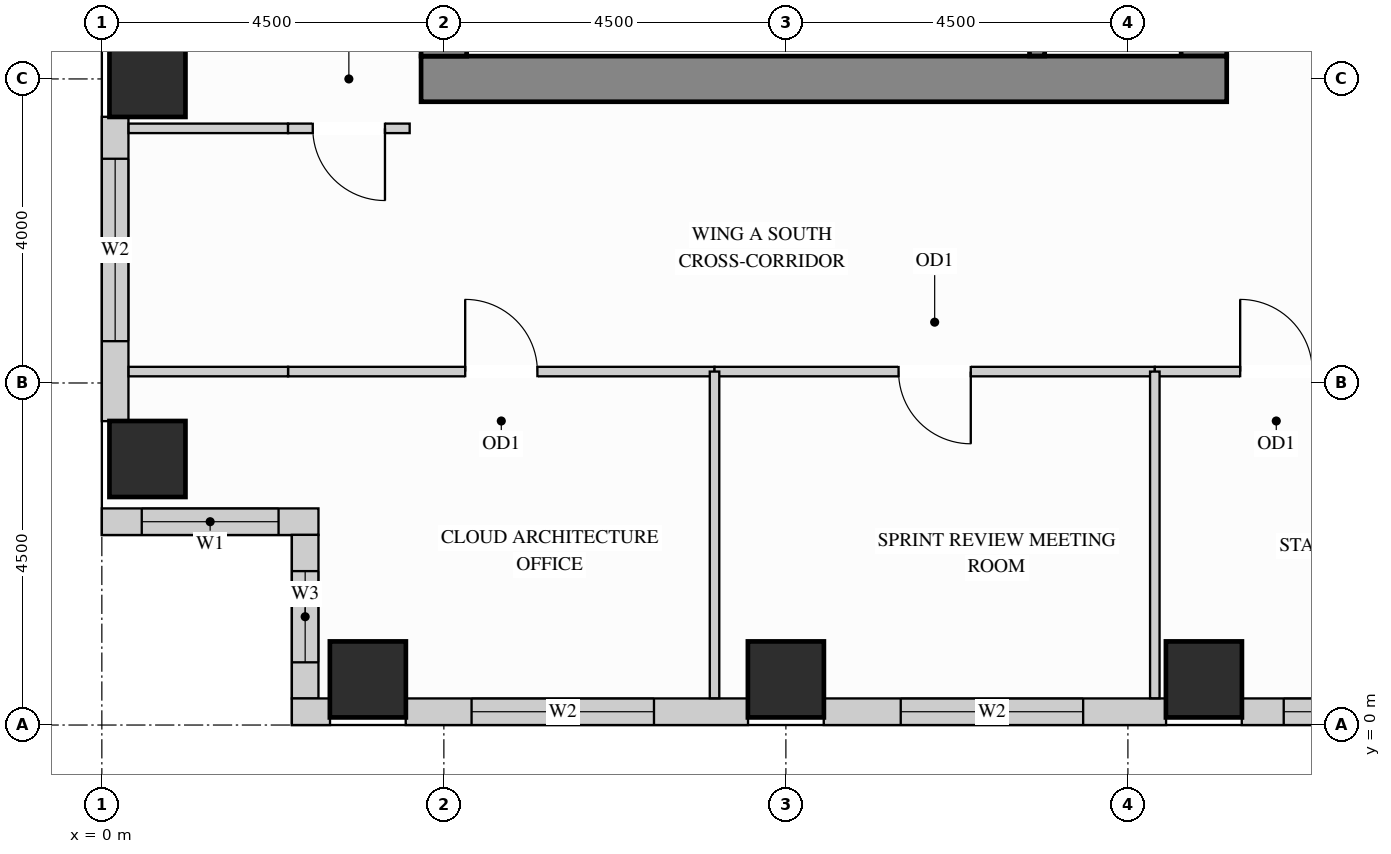
"""IFC4 building model, lengths in metres.
Left out: names, types, materials, properties, quantities, classifications, styles, units other than length and angle.
Written with IfcOpenShell. Run it as: python <this file> out.ifc"""

import sys

from ifc_helpers import new_model, si_unit, direction, frame, frame_2d, origin, origin_2d, place, context, subcontext, project, spatial, rectangle, extrude, source, transform, mapped, element, fill, save


model = new_model("IFC4")
c1 = context("Model", 3, precision=1e-05, world=origin(), true_north=direction((0.0, 1.0)))
c2 = subcontext(c1, "Body", "Model", "MODEL_VIEW")
j1 = project(units=[si_unit("LENGTHUNIT", "METRE"), si_unit("PLANEANGLEUNIT", "RADIAN")], contexts=[c1])
p1 = place(None, origin())
s1 = spatial("IfcSite", under=j1, at=p1, CompositionType="ELEMENT")
p2 = place(p1, origin())
s2 = spatial("IfcBuilding", under=s1, at=p2, CompositionType="ELEMENT")
p3 = place(p2, frame((0.0, 0.0, 143.1)))
s3 = spatial("IfcBuildingStorey", under=s2, at=p3, CompositionType="ELEMENT", Elevation=143.1)
m1 = source(origin(), c2, "Body", "SweptSolid", [
    extrude(rectangle(XDim=1.0, YDim=1.0, at=origin_2d()), origin(), (0.0, 0.0, 1.0), 3.4),
])
for number, where, z_axis, x_axis in (
    (1, (14.5, 0.6, 0.0), (0.0, 0.0, 1.0), (1.0, 0.0, 0.0)),
    (2, (3.5, 0.6, 0.0), (0.0, 0.0, 1.0), (1.0, 0.0, 0.0)),
    (3, (9.0, 0.6, 0.0), (0.0, 0.0, 1.0), (1.0, 0.0, 0.0)),
    (4, (0.6, 3.5, 0.0), (0.0, 0.0, 1.0), (1.0, 0.0, 0.0)),
    (5, (0.6, 8.5, 0.0), (0.0, 0.0, 1.0), (1.0, 0.0, 0.0)),
):
    element("IfcColumn", number, at=place(p3, frame(where, z_axis=z_axis, x_axis=x_axis)), inside=s3, PredefinedType="COLUMN", context=c2, shape_type="MappedRepresentation", body=[
        mapped(m1, transform((0.0, 0.0, 0.0), x_axis=(1.0, 0.0, 0.0), y_axis=(0.0, 1.0, 0.0), z_axis=(0.0, 0.0, 1.0))),
    ])
m2 = source(origin(), c2, "Body", "SweptSolid", [
    extrude(rectangle(XDim=10.02, YDim=0.6, at=frame_2d((5.01, 0.0))), origin(), (0.0, 0.0, 1.0), 3.4),
])
p4 = place(p3, frame((14.5, 8.8, 0.0), z_axis=(0.0, 0.0, 1.0), x_axis=(0.0, 1.0, 0.0)))
e6 = element("IfcWall", 6, at=p4, inside=s3, PredefinedType="SHEAR", context=c2, shape_type="MappedRepresentation", body=[
    mapped(m2, transform((0.0, 0.0, 0.0), x_axis=(1.0, 0.0, 0.0), y_axis=(0.0, 1.0, 0.0), z_axis=(0.0, 0.0, 1.0))),
])
m3 = source(origin(), c2, "Body", "SweptSolid", [
    extrude(rectangle(XDim=10.6, YDim=0.6, at=frame_2d((5.3, 0.0))), origin(), (0.0, 0.0, 1.0), 3.4),
])
p5 = place(p3, frame((4.2, 8.5, 0.0), z_axis=(0.0, 0.0, 1.0), x_axis=(1.0, 0.0, 0.0)))
e7 = element("IfcWall", 7, at=p5, inside=s3, PredefinedType="SHEAR", context=c2, shape_type="MappedRepresentation", body=[
    mapped(m3, transform((0.0, 0.0, 0.0), x_axis=(1.0, 0.0, 0.0), y_axis=(0.0, 1.0, 0.0), z_axis=(0.0, 0.0, 1.0))),
])
m4 = source(origin(), c2, "Body", "SweptSolid", [
    extrude(rectangle(XDim=20.4, YDim=0.6, at=frame_2d((10.2, 0.0))), origin(), (0.0, 0.0, 1.0), 3.4),
])
p6 = place(p3, frame((4.5, 8.8, 0.0), z_axis=(0.0, 0.0, 1.0), x_axis=(0.0, 1.0, 0.0)))
e8 = element("IfcWall", 8, at=p6, inside=s3, PredefinedType="SHEAR", context=c2, shape_type="MappedRepresentation", body=[
    mapped(m4, transform((0.0, 0.0, 0.0), x_axis=(1.0, 0.0, 0.0), y_axis=(0.0, 1.0, 0.0), z_axis=(0.0, 0.0, 1.0))),
])
p7 = place(p3, frame((0.175, 8.002, 0.0), z_axis=(0.0, 0.0, 1.0), x_axis=(0.0, -1.0, 0.0)))
e9 = element("IfcWall", 9, at=p7, inside=s3, PredefinedType="SOLIDWALL", context=c2, shape_type="SweptSolid", body=[
    extrude(rectangle(XDim=4.004, YDim=0.35, at=frame_2d((2.002, 0.0))), origin(), (0.0, 0.0, 1.0), 2.612),
])
p8 = place(p7, frame((0.552, 0.0, 0.78)))
e10 = element("IfcOpeningElement", 10, at=p8, cuts=e9, PredefinedType="OPENING", context=c2, shape_type="SweptSolid", body=[
    extrude(rectangle(XDim=2.4, YDim=1.652, at=frame_2d((1.2, 0.826))), frame((0.0, 0.185, 0.0), z_axis=(0.0, -1.0, 0.0), x_axis=(1.0, 0.0, 0.0)), (0.0, 0.0, 1.0), 0.37),
])
p9 = place(p3, frame((0.0, 2.675, 0.0), z_axis=(0.0, 0.0, 1.0), x_axis=(1.0, 0.0, 0.0)))
e11 = element("IfcWall", 11, at=p9, inside=s3, PredefinedType="SOLIDWALL", context=c2, shape_type="SweptSolid", body=[
    extrude(rectangle(XDim=2.85, YDim=0.35, at=frame_2d((1.425, 0.0))), origin(), (0.0, 0.0, 1.0), 3.385),
])
p10 = place(p9, frame((0.525, 0.0, 0.78)))
e12 = element("IfcOpeningElement", 12, at=p10, cuts=e11, PredefinedType="OPENING", context=c2, shape_type="SweptSolid", body=[
    extrude(rectangle(XDim=1.8, YDim=2.1, at=frame_2d((0.9, 1.05))), frame((0.0, 0.185, 0.0), z_axis=(0.0, -1.0, 0.0), x_axis=(1.0, 0.0, 0.0)), (0.0, 0.0, 1.0), 0.37),
])
p11 = place(p3, frame((2.675, 2.502, 0.0), z_axis=(0.0, 0.0, 1.0), x_axis=(0.0, -1.0, 0.0)))
e13 = element("IfcWall", 13, at=p11, inside=s3, PredefinedType="SOLIDWALL", context=c2, shape_type="SweptSolid", body=[
    extrude(rectangle(XDim=2.154, YDim=0.35, at=frame_2d((1.077, 0.0))), origin(), (0.0, 0.0, 1.0), 3.385),
])
p12 = place(p11, frame((0.477, 0.0, 0.78)))
e14 = element("IfcOpeningElement", 14, at=p12, cuts=e13, PredefinedType="OPENING", context=c2, shape_type="SweptSolid", body=[
    extrude(rectangle(XDim=1.2, YDim=2.1, at=frame_2d((0.6, 1.05))), frame((0.0, 0.185, 0.0), z_axis=(0.0, -1.0, 0.0), x_axis=(1.0, 0.0, 0.0)), (0.0, 0.0, 1.0), 0.37),
])
m5 = source(origin(), c2, "Body", "SweptSolid", [
    extrude(rectangle(XDim=0.502, YDim=0.35, at=frame_2d((0.251, 0.0))), origin(), (0.0, 0.0, 1.0), 3.385),
])
p13 = place(p3, frame((2.5, 0.175, 0.0), z_axis=(0.0, 0.0, 1.0), x_axis=(1.0, 0.0, 0.0)))
e15 = element("IfcWall", 15, at=p13, inside=s3, PredefinedType="SOLIDWALL", context=c2, shape_type="MappedRepresentation", body=[
    mapped(m5, transform((0.0, 0.0, 0.0), x_axis=(1.0, 0.0, 0.0), y_axis=(0.0, 1.0, 0.0), z_axis=(0.0, 0.0, 1.0))),
])
p14 = place(p3, frame((3.998, 0.175, 0.0), z_axis=(0.0, 0.0, 1.0), x_axis=(1.0, 0.0, 0.0)))
e16 = element("IfcWall", 16, at=p14, inside=s3, PredefinedType="SOLIDWALL", context=c2, shape_type="SweptSolid", body=[
    extrude(rectangle(XDim=4.504, YDim=0.35, at=frame_2d((2.252, 0.0))), origin(), (0.0, 0.0, 1.0), 2.612),
])
p15 = place(p14, frame((0.866, 0.0, 0.78)))
e17 = element("IfcOpeningElement", 17, at=p15, cuts=e16, PredefinedType="OPENING", context=c2, shape_type="SweptSolid", body=[
    extrude(rectangle(XDim=2.4, YDim=1.652, at=frame_2d((1.2, 0.826))), frame((0.0, 0.185, 0.0), z_axis=(0.0, -1.0, 0.0), x_axis=(1.0, 0.0, 0.0)), (0.0, 0.0, 1.0), 0.37),
])
p16 = place(p3, frame((9.498, 0.175, 0.0), z_axis=(0.0, 0.0, 1.0), x_axis=(1.0, 0.0, 0.0)))
e18 = element("IfcWall", 18, at=p16, inside=s3, PredefinedType="SOLIDWALL", context=c2, shape_type="SweptSolid", body=[
    extrude(rectangle(XDim=4.504, YDim=0.35, at=frame_2d((2.252, 0.0))), origin(), (0.0, 0.0, 1.0), 2.612),
])
p17 = place(p16, frame((1.013, 0.0, 0.78)))
e19 = element("IfcOpeningElement", 19, at=p17, cuts=e18, PredefinedType="OPENING", context=c2, shape_type="SweptSolid", body=[
    extrude(rectangle(XDim=2.4, YDim=1.652, at=frame_2d((1.2, 0.826))), frame((0.0, 0.185, 0.0), z_axis=(0.0, -1.0, 0.0), x_axis=(1.0, 0.0, 0.0)), (0.0, 0.0, 1.0), 0.37),
])
p18 = place(p3, frame((14.998, 0.175, 0.0), z_axis=(0.0, 0.0, 1.0), x_axis=(1.0, 0.0, 0.0)))
e20 = element("IfcWall", 20, at=p18, inside=s3, PredefinedType="SOLIDWALL", context=c2, shape_type="SweptSolid", body=[
    extrude(rectangle(XDim=3.504, YDim=0.35, at=frame_2d((1.752, 0.0))), origin(), (0.0, 0.0, 1.0), 2.612),
])
p19 = place(p18, frame((0.552, 0.0, 0.78)))
e21 = element("IfcOpeningElement", 21, at=p19, cuts=e20, PredefinedType="OPENING", context=c2, shape_type="SweptSolid", body=[
    extrude(rectangle(XDim=2.4, YDim=1.652, at=frame_2d((1.2, 0.826))), frame((0.0, 0.185, 0.0), z_axis=(0.0, -1.0, 0.0), x_axis=(1.0, 0.0, 0.0)), (0.0, 0.0, 1.0), 0.37),
])
m6 = source(origin(), c2, "Body", "SweptSolid", [
    extrude(rectangle(XDim=2.098, YDim=0.125, at=frame_2d((1.049, 0.0))), origin(), (0.0, 0.0, 1.0), 3.385),
])
p20 = place(p3, frame((0.352, 7.85, 0.0), z_axis=(0.0, 0.0, 1.0), x_axis=(1.0, 0.0, 0.0)))
e22 = element("IfcWall", 22, at=p20, inside=s3, PredefinedType="PARTITIONING", context=c2, shape_type="MappedRepresentation", body=[
    mapped(m6, transform((0.0, 0.0, 0.0), x_axis=(1.0, 0.0, 0.0), y_axis=(0.0, 1.0, 0.0), z_axis=(0.0, 0.0, 1.0))),
])
p21 = place(p3, frame((2.45, 7.85, 0.0), z_axis=(0.0, 0.0, 1.0), x_axis=(1.0, 0.0, 0.0)))
e23 = element("IfcWall", 23, at=p21, inside=s3, PredefinedType="PARTITIONING", context=c2, shape_type="SweptSolid", body=[
    extrude(rectangle(XDim=1.6, YDim=0.125, at=frame_2d((0.8, 0.0))), origin(), (0.0, 0.0, 1.0), 3.385),
])
p22 = place(p21, frame((0.325, 0.0, 0.0)))
e24 = element("IfcOpeningElement", 24, at=p22, cuts=e23, PredefinedType="OPENING", context=c2, shape_type="SweptSolid", body=[
    extrude(rectangle(XDim=0.95, YDim=2.15, at=frame_2d((0.475, 1.075))), frame((0.0, 0.073, 0.0), z_axis=(0.0, -1.0, 0.0), x_axis=(1.0, 0.0, 0.0)), (0.0, 0.0, 1.0), 0.145),
])
p23 = place(p3, frame((2.45, 4.65, 0.0), z_axis=(0.0, 0.0, 1.0), x_axis=(1.0, 0.0, 0.0)))
e25 = element("IfcWall", 25, at=p23, inside=s3, PredefinedType="PARTITIONING", context=c2, shape_type="SweptSolid", body=[
    extrude(rectangle(XDim=5.611, YDim=0.125, at=frame_2d((2.806, 0.0))), origin(), (0.0, 0.0, 1.0), 2.848),
])
p24 = place(p23, frame((2.331, 0.0, 0.0)))
e26 = element("IfcOpeningElement", 26, at=p24, cuts=e25, PredefinedType="OPENING", context=c2, shape_type="SweptSolid", body=[
    extrude(rectangle(XDim=0.95, YDim=2.15, at=frame_2d((0.475, 1.075))), frame((0.0, 0.073, 0.0), z_axis=(0.0, -1.0, 0.0), x_axis=(1.0, 0.0, 0.0)), (0.0, 0.0, 1.0), 0.145),
])
p25 = place(p3, frame((8.061, 4.65, 0.0), z_axis=(0.0, 0.0, 1.0), x_axis=(1.0, 0.0, 0.0)))
e27 = element("IfcWall", 27, at=p25, inside=s3, PredefinedType="PARTITIONING", context=c2, shape_type="SweptSolid", body=[
    extrude(rectangle(XDim=5.793, YDim=0.125, at=frame_2d((2.896, 0.0))), origin(), (0.0, 0.0, 1.0), 2.848),
])
p26 = place(p25, frame((2.421, 0.0, 0.0)))
e28 = element("IfcOpeningElement", 28, at=p26, cuts=e27, PredefinedType="OPENING", context=c2, shape_type="SweptSolid", body=[
    extrude(rectangle(XDim=0.95, YDim=2.15, at=frame_2d((0.475, 1.075))), frame((0.0, 0.073, 0.0), z_axis=(0.0, -1.0, 0.0), x_axis=(1.0, 0.0, 0.0)), (0.0, 0.0, 1.0), 0.145),
])
p27 = place(p3, frame((13.854, 4.65, 0.0), z_axis=(0.0, 0.0, 1.0), x_axis=(1.0, 0.0, 0.0)))
e29 = element("IfcWall", 29, at=p27, inside=s3, PredefinedType="PARTITIONING", context=c2, shape_type="SweptSolid", body=[
    extrude(rectangle(XDim=3.196, YDim=0.125, at=frame_2d((1.598, 0.0))), origin(), (0.0, 0.0, 1.0), 2.848),
])
p28 = place(p27, frame((1.123, 0.0, 0.0)))
e30 = element("IfcOpeningElement", 30, at=p28, cuts=e29, PredefinedType="OPENING", context=c2, shape_type="SweptSolid", body=[
    extrude(rectangle(XDim=0.95, YDim=2.15, at=frame_2d((0.475, 1.075))), frame((0.0, 0.073, 0.0), z_axis=(0.0, -1.0, 0.0), x_axis=(1.0, 0.0, 0.0)), (0.0, 0.0, 1.0), 0.145),
])
m7 = source(origin(), c2, "Body", "SweptSolid", [
    extrude(rectangle(XDim=2.098, YDim=0.125, at=frame_2d((1.049, 0.0))), origin(), (0.0, 0.0, 1.0), 2.848),
])
p29 = place(p3, frame((0.352, 4.65, 0.0), z_axis=(0.0, 0.0, 1.0), x_axis=(1.0, 0.0, 0.0)))
e31 = element("IfcWall", 31, at=p29, inside=s3, PredefinedType="PARTITIONING", context=c2, shape_type="MappedRepresentation", body=[
    mapped(m7, transform((0.0, 0.0, 0.0), x_axis=(1.0, 0.0, 0.0), y_axis=(0.0, 1.0, 0.0), z_axis=(0.0, 0.0, 1.0))),
])
m8 = source(origin(), c2, "Body", "SweptSolid", [
    extrude(rectangle(XDim=4.298, YDim=0.125, at=frame_2d((2.149, 0.0))), origin(), (0.0, 0.0, 1.0), 3.385),
])
for number, where, z_axis, x_axis in (
    (32, (8.061, 0.352, 0.0), (0.0, 0.0, 1.0), (0.0, 1.0, 0.0)),
    (33, (13.854, 0.352, 0.0), (0.0, 0.0, 1.0), (0.0, 1.0, 0.0)),
):
    element("IfcWall", number, at=place(p3, frame(where, z_axis=z_axis, x_axis=x_axis)), inside=s3, PredefinedType="PARTITIONING", context=c2, shape_type="MappedRepresentation", body=[
        mapped(m8, transform((0.0, 0.0, 0.0), x_axis=(1.0, 0.0, 0.0), y_axis=(0.0, 1.0, 0.0), z_axis=(0.0, 0.0, 1.0))),
    ])
m9 = source(origin(), c2, "Body", "SweptSolid", [
    extrude(rectangle(XDim=3.753, YDim=0.2, at=frame_2d((1.876, 0.0))), origin(), (0.0, 0.0, 1.0), 3.4),
])
p30 = place(p3, frame((12.305, 8.802, 0.0), z_axis=(0.0, 0.0, 1.0), x_axis=(0.0, 1.0, 0.0)))
e34 = element("IfcWall", 34, at=p30, inside=s3, PredefinedType="SHEAR", context=c2, shape_type="MappedRepresentation", body=[
    mapped(m9, transform((0.0, 0.0, 0.0), x_axis=(1.0, 0.0, 0.0), y_axis=(0.0, 1.0, 0.0), z_axis=(0.0, 0.0, 1.0))),
])
m10 = source(origin(), c2, "Body", "SweptSolid", [
    extrude(rectangle(XDim=0.95, YDim=2.15, at=frame_2d((0.475, 1.075))), frame((0.0, 0.025, 0.0), z_axis=(0.0, -1.0, 0.0), x_axis=(1.0, 0.0, 0.0)), (0.0, 0.0, 1.0), 0.05),
])
p31 = place(p24, origin())
e35 = element("IfcDoor", 35, at=p31, inside=s3, OperationType="SINGLE_SWING_LEFT", PredefinedType="DOOR", context=c2, shape_type="MappedRepresentation", body=[
    mapped(m10, transform((0.0, 0.0, 0.0), x_axis=(1.0, 0.0, 0.0), y_axis=(0.0, 1.0, 0.0), z_axis=(0.0, 0.0, 1.0))),
])
fill(e26, e35)
p32 = place(p26, origin())
e36 = element("IfcDoor", 36, at=p32, inside=s3, OperationType="SINGLE_SWING_RIGHT", PredefinedType="DOOR", context=c2, shape_type="MappedRepresentation", body=[
    mapped(m10, transform((0.0, 0.0, 0.0), x_axis=(1.0, 0.0, 0.0), y_axis=(0.0, 1.0, 0.0), z_axis=(0.0, 0.0, 1.0))),
])
fill(e28, e36)
p33 = place(p28, origin())
e37 = element("IfcDoor", 37, at=p33, inside=s3, OperationType="SINGLE_SWING_LEFT", PredefinedType="DOOR", context=c2, shape_type="MappedRepresentation", body=[
    mapped(m10, transform((0.0, 0.0, 0.0), x_axis=(1.0, 0.0, 0.0), y_axis=(0.0, 1.0, 0.0), z_axis=(0.0, 0.0, 1.0))),
])
fill(e30, e37)
p34 = place(p22, origin())
e38 = element("IfcDoor", 38, at=p34, inside=s3, OperationType="SINGLE_SWING_RIGHT", PredefinedType="DOOR", context=c2, shape_type="MappedRepresentation", body=[
    mapped(m10, transform((0.0, 0.0, 0.0), x_axis=(1.0, 0.0, 0.0), y_axis=(0.0, 1.0, 0.0), z_axis=(0.0, 0.0, 1.0))),
])
fill(e24, e38)
m11 = source(origin(), c2, "Body", "SweptSolid", [
    extrude(rectangle(XDim=1.8, YDim=2.1, at=frame_2d((0.9, 1.05))), frame((0.0, 0.03, 0.0), z_axis=(0.0, -1.0, 0.0), x_axis=(1.0, 0.0, 0.0)), (0.0, 0.0, 1.0), 0.06),
])
p35 = place(p10, origin())
e39 = element("IfcWindow", 39, at=p35, inside=s3, PartitioningType="SINGLE_PANEL", PredefinedType="WINDOW", context=c2, shape_type="MappedRepresentation", body=[
    mapped(m11, transform((0.0, 0.0, 0.0), x_axis=(1.0, 0.0, 0.0), y_axis=(0.0, 1.0, 0.0), z_axis=(0.0, 0.0, 1.0))),
])
fill(e12, e39)
m12 = source(origin(), c2, "Body", "SweptSolid", [
    extrude(rectangle(XDim=2.4, YDim=1.652, at=frame_2d((1.2, 0.826))), frame((0.0, 0.03, 0.0), z_axis=(0.0, -1.0, 0.0), x_axis=(1.0, 0.0, 0.0)), (0.0, 0.0, 1.0), 0.06),
])
p36 = place(p8, origin())
e40 = element("IfcWindow", 40, at=p36, inside=s3, PartitioningType="SINGLE_PANEL", PredefinedType="WINDOW", context=c2, shape_type="MappedRepresentation", body=[
    mapped(m12, transform((0.0, 0.0, 0.0), x_axis=(1.0, 0.0, 0.0), y_axis=(0.0, 1.0, 0.0), z_axis=(0.0, 0.0, 1.0))),
])
fill(e10, e40)
p37 = place(p15, origin())
e41 = element("IfcWindow", 41, at=p37, inside=s3, PartitioningType="SINGLE_PANEL", PredefinedType="WINDOW", context=c2, shape_type="MappedRepresentation", body=[
    mapped(m12, transform((0.0, 0.0, 0.0), x_axis=(1.0, 0.0, 0.0), y_axis=(0.0, 1.0, 0.0), z_axis=(0.0, 0.0, 1.0))),
])
fill(e17, e41)
p38 = place(p17, origin())
e42 = element("IfcWindow", 42, at=p38, inside=s3, PartitioningType="SINGLE_PANEL", PredefinedType="WINDOW", context=c2, shape_type="MappedRepresentation", body=[
    mapped(m12, transform((0.0, 0.0, 0.0), x_axis=(1.0, 0.0, 0.0), y_axis=(0.0, 1.0, 0.0), z_axis=(0.0, 0.0, 1.0))),
])
fill(e19, e42)
p39 = place(p19, origin())
e43 = element("IfcWindow", 43, at=p39, inside=s3, PartitioningType="SINGLE_PANEL", PredefinedType="WINDOW", context=c2, shape_type="MappedRepresentation", body=[
    mapped(m12, transform((0.0, 0.0, 0.0), x_axis=(1.0, 0.0, 0.0), y_axis=(0.0, 1.0, 0.0), z_axis=(0.0, 0.0, 1.0))),
])
fill(e21, e43)
m13 = source(origin(), c2, "Body", "SweptSolid", [
    extrude(rectangle(XDim=1.2, YDim=2.1, at=frame_2d((0.6, 1.05))), frame((0.0, 0.03, 0.0), z_axis=(0.0, -1.0, 0.0), x_axis=(1.0, 0.0, 0.0)), (0.0, 0.0, 1.0), 0.06),
])
p40 = place(p12, origin())
e44 = element("IfcWindow", 44, at=p40, inside=s3, PartitioningType="SINGLE_PANEL", PredefinedType="WINDOW", context=c2, shape_type="MappedRepresentation", body=[
    mapped(m13, transform((0.0, 0.0, 0.0), x_axis=(1.0, 0.0, 0.0), y_axis=(0.0, 1.0, 0.0), z_axis=(0.0, 0.0, 1.0))),
])
fill(e14, e44)
save(model, sys.argv[1])
